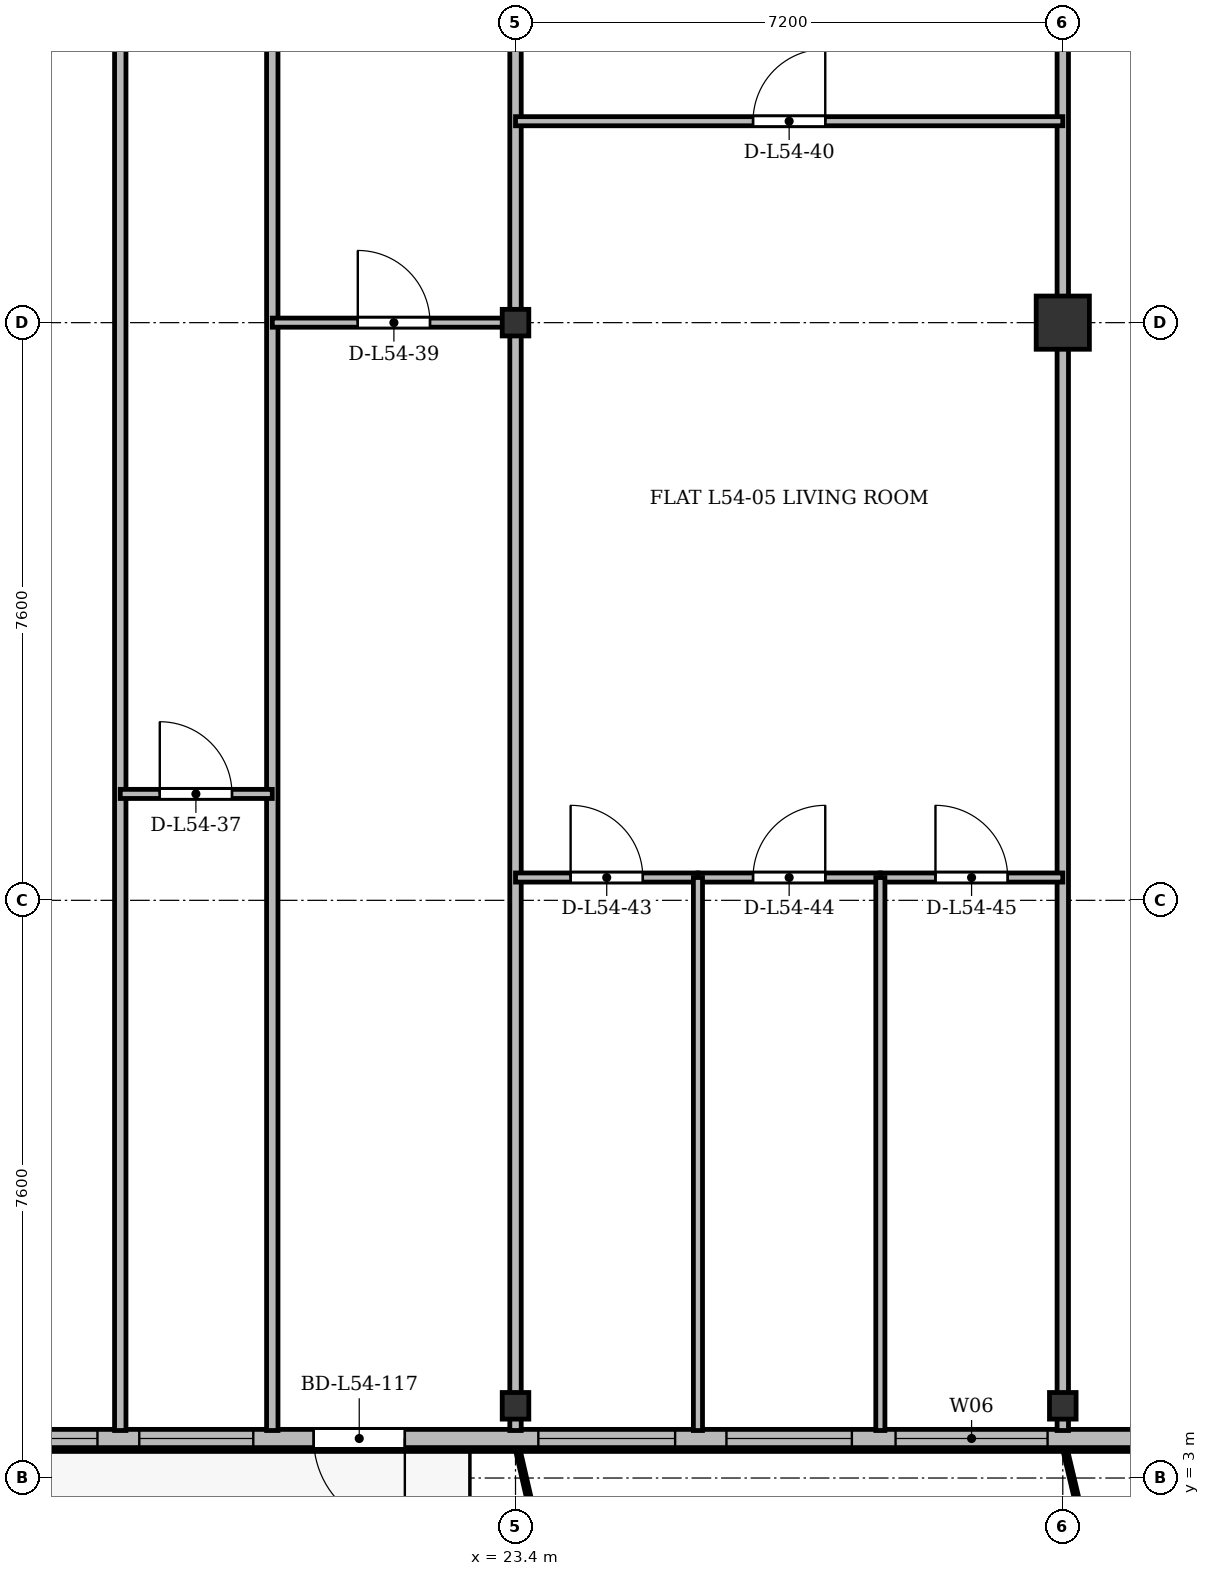
"""IFC4 building model, lengths in metres.
Left out: names, types, materials, properties, quantities, classifications, styles, units other than length and angle.
Written with IfcOpenShell. Run it as: python <this file> out.ifc"""

import sys

from ifc_helpers import new_model, si_unit, direction, frame, frame_2d, origin, origin_2d, place, context, subcontext, project, spatial, rectangle, i_section, extrude, source, transform, mapped, element, fill, save


model = new_model("IFC4")
c1 = context("Model", 3, precision=1e-05, world=origin(), true_north=direction((0.0, 1.0)))
c2 = subcontext(c1, "Body", "Model", "MODEL_VIEW")
j1 = project(units=[si_unit("LENGTHUNIT", "METRE"), si_unit("PLANEANGLEUNIT", "RADIAN")], contexts=[c1])
p1 = place(None, origin())
s1 = spatial("IfcSite", under=j1, at=p1, CompositionType="ELEMENT")
p2 = place(p1, origin())
s2 = spatial("IfcBuilding", under=s1, at=p2, CompositionType="ELEMENT")
p3 = place(p2, frame((0.0, 0.0, 208.5)))
s3 = spatial("IfcBuildingStorey", under=s2, at=p3, CompositionType="ELEMENT", Elevation=208.5)
m1 = source(origin(), c2, "Body", "SweptSolid", [
    extrude(i_section(OverallWidth=0.35, OverallDepth=0.35, WebThickness=0.018, FlangeThickness=0.028, at=origin_2d()), origin(), (0.0, 0.0, 1.0), 3.6),
])
for number, where, z_axis, x_axis in (
    (1, (23.4, 3.95, 0.0), (0.0, 0.0, 1.0), (1.0, 0.0, 0.0)),
    (2, (23.4, 18.2, 0.0), (0.0, 0.0, 1.0), (1.0, 0.0, 0.0)),
    (3, (30.6, 3.95, 0.0), (0.0, 0.0, 1.0), (1.0, 0.0, 0.0)),
):
    element("IfcColumn", number, at=place(p3, frame(where, z_axis=z_axis, x_axis=x_axis)), inside=s3, PredefinedType="COLUMN", context=c2, shape_type="MappedRepresentation", body=[
        mapped(m1, transform((0.0, 0.0, 0.0), x_axis=(1.0, 0.0, 0.0), y_axis=(0.0, 1.0, 0.0), z_axis=(0.0, 0.0, 1.0), scale=1.0)),
    ])
m2 = source(origin(), c2, "Body", "SweptSolid", [
    extrude(rectangle(XDim=0.7, YDim=0.7, at=origin_2d()), origin(), (0.0, 0.0, 1.0), 3.6),
])
p4 = place(p3, frame((30.6, 18.2, 0.0), z_axis=(0.0, 0.0, 1.0), x_axis=(1.0, 0.0, 0.0)))
e4 = element("IfcColumn", 4, at=p4, inside=s3, PredefinedType="COLUMN", context=c2, shape_type="MappedRepresentation", body=[
    mapped(m2, transform((0.0, 0.0, 0.0), x_axis=(1.0, 0.0, 0.0), y_axis=(0.0, 1.0, 0.0), z_axis=(0.0, 0.0, 1.0), scale=1.0)),
])
p5 = place(p3, frame((63.4, 3.52, 0.0), z_axis=(0.0, 0.0, 1.0), x_axis=(-1.0, 0.0, 0.0)))
e5 = element("IfcWall", 5, at=p5, inside=s3, PredefinedType="SOLIDWALL", context=c2, shape_type="SweptSolid", body=[
    extrude(rectangle(XDim=52.4, YDim=0.24, at=frame_2d((26.2, 0.0))), origin(), (0.0, 0.0, 1.0), 3.36),
])
p6 = place(p5, frame((1.52, 0.0, 0.9)))
e6 = element("IfcOpeningElement", 6, at=p6, cuts=e5, PredefinedType="OPENING", context=c2, shape_type="SweptSolid", body=[
    extrude(rectangle(XDim=1.65, YDim=1.85, at=frame_2d((0.825, 0.925))), frame((0.0, 0.13, 0.0), z_axis=(0.0, -1.0, 0.0), x_axis=(1.0, 0.0, 0.0)), (0.0, 0.0, 1.0), 0.26),
])
p7 = place(p5, frame((5.0, 0.0, 0.9)))
e7 = element("IfcOpeningElement", 7, at=p7, cuts=e5, PredefinedType="OPENING", context=c2, shape_type="SweptSolid", body=[
    extrude(rectangle(XDim=1.8, YDim=1.8, at=frame_2d((0.9, 0.9))), frame((0.0, 0.13, 0.0), z_axis=(0.0, -1.0, 0.0), x_axis=(1.0, 0.0, 0.0)), (0.0, 0.0, 1.0), 0.26),
])
p8 = place(p5, frame((7.45, 0.0, 0.9)))
e8 = element("IfcOpeningElement", 8, at=p8, cuts=e5, PredefinedType="OPENING", context=c2, shape_type="SweptSolid", body=[
    extrude(rectangle(XDim=1.5, YDim=1.75, at=frame_2d((0.75, 0.875))), frame((0.0, 0.13, 0.0), z_axis=(0.0, -1.0, 0.0), x_axis=(1.0, 0.0, 0.0)), (0.0, 0.0, 1.0), 0.26),
])
p9 = place(p5, frame((10.05, 0.0, 0.9)))
e9 = element("IfcOpeningElement", 9, at=p9, cuts=e5, PredefinedType="OPENING", context=c2, shape_type="SweptSolid", body=[
    extrude(rectangle(XDim=1.5, YDim=1.75, at=frame_2d((0.75, 0.875))), frame((0.0, 0.13, 0.0), z_axis=(0.0, -1.0, 0.0), x_axis=(1.0, 0.0, 0.0)), (0.0, 0.0, 1.0), 0.26),
])
p10 = place(p5, frame((14.217, 0.0, 0.0)))
e10 = element("IfcOpeningElement", 10, at=p10, cuts=e5, PredefinedType="OPENING", context=c2, shape_type="SweptSolid", body=[
    extrude(rectangle(XDim=1.2, YDim=2.2, at=frame_2d((0.6, 1.1))), frame((0.0, 0.13, 0.0), z_axis=(0.0, -1.0, 0.0), x_axis=(1.0, 0.0, 0.0)), (0.0, 0.0, 1.0), 0.26),
])
p11 = place(p5, frame((20.108, 0.0, 0.9)))
e11 = element("IfcOpeningElement", 11, at=p11, cuts=e5, PredefinedType="OPENING", context=c2, shape_type="SweptSolid", body=[
    extrude(rectangle(XDim=1.65, YDim=1.85, at=frame_2d((0.825, 0.925))), frame((0.0, 0.13, 0.0), z_axis=(0.0, -1.0, 0.0), x_axis=(1.0, 0.0, 0.0)), (0.0, 0.0, 1.0), 0.26),
])
p12 = place(p5, frame((22.7, 0.0, 0.9)))
e12 = element("IfcOpeningElement", 12, at=p12, cuts=e5, PredefinedType="OPENING", context=c2, shape_type="SweptSolid", body=[
    extrude(rectangle(XDim=1.8, YDim=1.8, at=frame_2d((0.9, 0.9))), frame((0.0, 0.13, 0.0), z_axis=(0.0, -1.0, 0.0), x_axis=(1.0, 0.0, 0.0)), (0.0, 0.0, 1.0), 0.26),
])
p13 = place(p5, frame((25.166, 0.0, 0.9)))
e13 = element("IfcOpeningElement", 13, at=p13, cuts=e5, PredefinedType="OPENING", context=c2, shape_type="SweptSolid", body=[
    extrude(rectangle(XDim=2.2, YDim=1.8, at=frame_2d((1.1, 0.9))), frame((0.0, 0.13, 0.0), z_axis=(0.0, -1.0, 0.0), x_axis=(1.0, 0.0, 0.0)), (0.0, 0.0, 1.0), 0.26),
])
p14 = place(p5, frame((29.45, 0.0, 0.9)))
e14 = element("IfcOpeningElement", 14, at=p14, cuts=e5, PredefinedType="OPENING", context=c2, shape_type="SweptSolid", body=[
    extrude(rectangle(XDim=1.5, YDim=1.75, at=frame_2d((0.75, 0.875))), frame((0.0, 0.13, 0.0), z_axis=(0.0, -1.0, 0.0), x_axis=(1.0, 0.0, 0.0)), (0.0, 0.0, 1.0), 0.26),
])
p15 = place(p5, frame((33.0, 0.0, 0.9)))
e15 = element("IfcOpeningElement", 15, at=p15, cuts=e5, PredefinedType="OPENING", context=c2, shape_type="SweptSolid", body=[
    extrude(rectangle(XDim=2.0, YDim=1.95, at=frame_2d((1.0, 0.975))), frame((0.0, 0.13, 0.0), z_axis=(0.0, -1.0, 0.0), x_axis=(1.0, 0.0, 0.0)), (0.0, 0.0, 1.0), 0.26),
])
p16 = place(p5, frame((35.575, 0.0, 0.9)))
e16 = element("IfcOpeningElement", 16, at=p16, cuts=e5, PredefinedType="OPENING", context=c2, shape_type="SweptSolid", body=[
    extrude(rectangle(XDim=1.65, YDim=1.85, at=frame_2d((0.825, 0.925))), frame((0.0, 0.13, 0.0), z_axis=(0.0, -1.0, 0.0), x_axis=(1.0, 0.0, 0.0)), (0.0, 0.0, 1.0), 0.26),
])
p17 = place(p5, frame((37.9, 0.0, 0.9)))
e17 = element("IfcOpeningElement", 17, at=p17, cuts=e5, PredefinedType="OPENING", context=c2, shape_type="SweptSolid", body=[
    extrude(rectangle(XDim=1.8, YDim=1.8, at=frame_2d((0.9, 0.9))), frame((0.0, 0.13, 0.0), z_axis=(0.0, -1.0, 0.0), x_axis=(1.0, 0.0, 0.0)), (0.0, 0.0, 1.0), 0.26),
])
p18 = place(p5, frame((41.456, 0.0, 0.0)))
e18 = element("IfcOpeningElement", 18, at=p18, cuts=e5, PredefinedType="OPENING", context=c2, shape_type="SweptSolid", body=[
    extrude(rectangle(XDim=1.2, YDim=2.2, at=frame_2d((0.6, 1.1))), frame((0.0, 0.13, 0.0), z_axis=(0.0, -1.0, 0.0), x_axis=(1.0, 0.0, 0.0)), (0.0, 0.0, 1.0), 0.26),
])
p19 = place(p5, frame((43.45, 0.0, 0.9)))
e19 = element("IfcOpeningElement", 19, at=p19, cuts=e5, PredefinedType="OPENING", context=c2, shape_type="SweptSolid", body=[
    extrude(rectangle(XDim=1.5, YDim=1.75, at=frame_2d((0.75, 0.875))), frame((0.0, 0.13, 0.0), z_axis=(0.0, -1.0, 0.0), x_axis=(1.0, 0.0, 0.0)), (0.0, 0.0, 1.0), 0.26),
])
p20 = place(p5, frame((45.5, 0.0, 0.9)))
e20 = element("IfcOpeningElement", 20, at=p20, cuts=e5, PredefinedType="OPENING", context=c2, shape_type="SweptSolid", body=[
    extrude(rectangle(XDim=2.0, YDim=1.95, at=frame_2d((1.0, 0.975))), frame((0.0, 0.13, 0.0), z_axis=(0.0, -1.0, 0.0), x_axis=(1.0, 0.0, 0.0)), (0.0, 0.0, 1.0), 0.26),
])
p21 = place(p5, frame((49.23, 0.0, 0.9)))
e21 = element("IfcOpeningElement", 21, at=p21, cuts=e5, PredefinedType="OPENING", context=c2, shape_type="SweptSolid", body=[
    extrude(rectangle(XDim=1.65, YDim=1.85, at=frame_2d((0.825, 0.925))), frame((0.0, 0.13, 0.0), z_axis=(0.0, -1.0, 0.0), x_axis=(1.0, 0.0, 0.0)), (0.0, 0.0, 1.0), 0.26),
])
for number, where, z_axis, x_axis in (
    (22, (23.4, 3.625, 0.0), (0.0, 0.0, 1.0), (0.0, 1.0, 0.0)),
    (23, (30.6, 3.625, 0.0), (0.0, 0.0, 1.0), (0.0, 1.0, 0.0)),
):
    element("IfcWall", number, at=place(p3, frame(where, z_axis=z_axis, x_axis=x_axis)), inside=s3, PredefinedType="PARTITIONING", context=c2, shape_type="SweptSolid", body=[
        extrude(rectangle(XDim=27.175, YDim=0.15, at=frame_2d((13.587, 0.0))), origin(), (0.0, 0.0, 1.0), 2.86),
    ])
for number, where, z_axis, x_axis in (
    (24, (18.2, 3.625, 0.0), (0.0, 0.0, 1.0), (0.0, 1.0, 0.0)),
    (25, (20.2, 3.625, 0.0), (0.0, 0.0, 1.0), (0.0, 1.0, 0.0)),
):
    element("IfcWall", number, at=place(p3, frame(where, z_axis=z_axis, x_axis=x_axis)), inside=s3, PredefinedType="PARTITIONING", context=c2, shape_type="SweptSolid", body=[
        extrude(rectangle(XDim=27.175, YDim=0.15, at=frame_2d((13.587, 0.0))), origin(), (0.0, 0.0, 1.0), 2.91),
    ])
p22 = place(p3, frame((18.2, 12.0, 0.0), z_axis=(0.0, 0.0, 1.0), x_axis=(1.0, 0.0, 0.0)))
e26 = element("IfcWall", 26, at=p22, inside=s3, PredefinedType="PARTITIONING", context=c2, shape_type="SweptSolid", body=[
    extrude(rectangle(XDim=2.0, YDim=0.12, at=frame_2d((1.0, 0.0))), origin(), (0.0, 0.0, 1.0), 3.36),
])
p23 = place(p22, frame((0.52, 0.0, 0.0)))
e27 = element("IfcOpeningElement", 27, at=p23, cuts=e26, PredefinedType="OPENING", context=c2, shape_type="SweptSolid", body=[
    extrude(rectangle(XDim=0.95, YDim=2.15, at=frame_2d((0.475, 1.075))), frame((0.0, 0.07, 0.0), z_axis=(0.0, -1.0, 0.0), x_axis=(1.0, 0.0, 0.0)), (0.0, 0.0, 1.0), 0.14),
])
p24 = place(p3, frame((20.2, 18.2, 0.0), z_axis=(0.0, 0.0, 1.0), x_axis=(1.0, 0.0, 0.0)))
e28 = element("IfcWall", 28, at=p24, inside=s3, PredefinedType="PARTITIONING", context=c2, shape_type="SweptSolid", body=[
    extrude(rectangle(XDim=3.2, YDim=0.12, at=frame_2d((1.6, 0.0))), origin(), (0.0, 0.0, 1.0), 2.91),
])
p25 = place(p24, frame((1.125, 0.0, 0.0)))
e29 = element("IfcOpeningElement", 29, at=p25, cuts=e28, PredefinedType="OPENING", context=c2, shape_type="SweptSolid", body=[
    extrude(rectangle(XDim=0.95, YDim=2.15, at=frame_2d((0.475, 1.075))), frame((0.0, 0.07, 0.0), z_axis=(0.0, -1.0, 0.0), x_axis=(1.0, 0.0, 0.0)), (0.0, 0.0, 1.0), 0.14),
])
p26 = place(p3, frame((23.4, 20.85, 0.0), z_axis=(0.0, 0.0, 1.0), x_axis=(1.0, 0.0, 0.0)))
e30 = element("IfcWall", 30, at=p26, inside=s3, PredefinedType="PARTITIONING", context=c2, shape_type="SweptSolid", body=[
    extrude(rectangle(XDim=7.2, YDim=0.12, at=frame_2d((3.6, 0.0))), origin(), (0.0, 0.0, 1.0), 2.86),
])
p27 = place(p26, frame((3.125, 0.0, 0.0)))
e31 = element("IfcOpeningElement", 31, at=p27, cuts=e30, PredefinedType="OPENING", context=c2, shape_type="SweptSolid", body=[
    extrude(rectangle(XDim=0.95, YDim=2.15, at=frame_2d((0.475, 1.075))), frame((0.0, 0.07, 0.0), z_axis=(0.0, -1.0, 0.0), x_axis=(1.0, 0.0, 0.0)), (0.0, 0.0, 1.0), 0.14),
])
p28 = place(p3, frame((23.4, 10.9, 0.0), z_axis=(0.0, 0.0, 1.0), x_axis=(1.0, 0.0, 0.0)))
e32 = element("IfcWall", 32, at=p28, inside=s3, PredefinedType="PARTITIONING", context=c2, shape_type="SweptSolid", body=[
    extrude(rectangle(XDim=2.4, YDim=0.12, at=frame_2d((1.2, 0.0))), origin(), (0.0, 0.0, 1.0), 2.86),
])
p29 = place(p28, frame((0.725, 0.0, 0.0)))
e33 = element("IfcOpeningElement", 33, at=p29, cuts=e32, PredefinedType="OPENING", context=c2, shape_type="SweptSolid", body=[
    extrude(rectangle(XDim=0.95, YDim=2.15, at=frame_2d((0.475, 1.075))), frame((0.0, 0.07, 0.0), z_axis=(0.0, -1.0, 0.0), x_axis=(1.0, 0.0, 0.0)), (0.0, 0.0, 1.0), 0.14),
])
p30 = place(p3, frame((25.8, 10.9, 0.0), z_axis=(0.0, 0.0, 1.0), x_axis=(1.0, 0.0, 0.0)))
e34 = element("IfcWall", 34, at=p30, inside=s3, PredefinedType="PARTITIONING", context=c2, shape_type="SweptSolid", body=[
    extrude(rectangle(XDim=2.4, YDim=0.12, at=frame_2d((1.2, 0.0))), origin(), (0.0, 0.0, 1.0), 3.36),
])
p31 = place(p30, frame((0.725, 0.0, 0.0)))
e35 = element("IfcOpeningElement", 35, at=p31, cuts=e34, PredefinedType="OPENING", context=c2, shape_type="SweptSolid", body=[
    extrude(rectangle(XDim=0.95, YDim=2.15, at=frame_2d((0.475, 1.075))), frame((0.0, 0.07, 0.0), z_axis=(0.0, -1.0, 0.0), x_axis=(1.0, 0.0, 0.0)), (0.0, 0.0, 1.0), 0.14),
])
p32 = place(p3, frame((25.8, 3.625, 0.0), z_axis=(0.0, 0.0, 1.0), x_axis=(0.0, 1.0, 0.0)))
e36 = element("IfcWall", 36, at=p32, inside=s3, PredefinedType="PARTITIONING", context=c2, shape_type="SweptSolid", body=[
    extrude(rectangle(XDim=7.275, YDim=0.12, at=frame_2d((3.637, 0.0))), origin(), (0.0, 0.0, 1.0), 2.91),
])
p33 = place(p3, frame((28.2, 10.9, 0.0), z_axis=(0.0, 0.0, 1.0), x_axis=(1.0, 0.0, 0.0)))
e37 = element("IfcWall", 37, at=p33, inside=s3, PredefinedType="PARTITIONING", context=c2, shape_type="SweptSolid", body=[
    extrude(rectangle(XDim=2.4, YDim=0.12, at=frame_2d((1.2, 0.0))), origin(), (0.0, 0.0, 1.0), 2.86),
])
p34 = place(p33, frame((0.725, 0.0, 0.0)))
e38 = element("IfcOpeningElement", 38, at=p34, cuts=e37, PredefinedType="OPENING", context=c2, shape_type="SweptSolid", body=[
    extrude(rectangle(XDim=0.95, YDim=2.15, at=frame_2d((0.475, 1.075))), frame((0.0, 0.07, 0.0), z_axis=(0.0, -1.0, 0.0), x_axis=(1.0, 0.0, 0.0)), (0.0, 0.0, 1.0), 0.14),
])
p35 = place(p3, frame((28.2, 3.625, 0.0), z_axis=(0.0, 0.0, 1.0), x_axis=(0.0, 1.0, 0.0)))
e39 = element("IfcWall", 39, at=p35, inside=s3, PredefinedType="PARTITIONING", context=c2, shape_type="SweptSolid", body=[
    extrude(rectangle(XDim=7.275, YDim=0.12, at=frame_2d((3.637, 0.0))), origin(), (0.0, 0.0, 1.0), 2.91),
])
m3 = source(origin(), c2, "Body", "SweptSolid", [
    extrude(rectangle(XDim=2.0, YDim=1.95, at=frame_2d((1.0, 0.975))), frame((0.0, 0.03, 0.0), z_axis=(0.0, -1.0, 0.0), x_axis=(1.0, 0.0, 0.0)), (0.0, 0.0, 1.0), 0.06),
])
p36 = place(p15, origin())
e40 = element("IfcWindow", 40, at=p36, inside=s3, PartitioningType="SINGLE_PANEL", PredefinedType="WINDOW", context=c2, shape_type="MappedRepresentation", body=[
    mapped(m3, transform((0.0, 0.0, 0.0), x_axis=(1.0, 0.0, 0.0), y_axis=(0.0, 1.0, 0.0), z_axis=(0.0, 0.0, 1.0), scale=1.0)),
])
fill(e15, e40)
m4 = source(origin(), c2, "Body", "SweptSolid", [
    extrude(rectangle(XDim=1.65, YDim=1.85, at=frame_2d((0.825, 0.925))), frame((0.0, 0.03, 0.0), z_axis=(0.0, -1.0, 0.0), x_axis=(1.0, 0.0, 0.0)), (0.0, 0.0, 1.0), 0.06),
])
p37 = place(p16, origin())
e41 = element("IfcWindow", 41, at=p37, inside=s3, PartitioningType="SINGLE_PANEL", PredefinedType="WINDOW", context=c2, shape_type="MappedRepresentation", body=[
    mapped(m4, transform((0.0, 0.0, 0.0), x_axis=(1.0, 0.0, 0.0), y_axis=(0.0, 1.0, 0.0), z_axis=(0.0, 0.0, 1.0), scale=1.0)),
])
fill(e16, e41)
m5 = source(origin(), c2, "Body", "SweptSolid", [
    extrude(rectangle(XDim=1.8, YDim=1.8, at=frame_2d((0.9, 0.9))), frame((0.0, 0.03, 0.0), z_axis=(0.0, -1.0, 0.0), x_axis=(1.0, 0.0, 0.0)), (0.0, 0.0, 1.0), 0.06),
])
p38 = place(p17, origin())
e42 = element("IfcWindow", 42, at=p38, inside=s3, PartitioningType="SINGLE_PANEL", PredefinedType="WINDOW", context=c2, shape_type="MappedRepresentation", body=[
    mapped(m5, transform((0.0, 0.0, 0.0), x_axis=(1.0, 0.0, 0.0), y_axis=(0.0, 1.0, 0.0), z_axis=(0.0, 0.0, 1.0), scale=1.0)),
])
fill(e17, e42)
m6 = source(origin(), c2, "Body", "SweptSolid", [
    extrude(rectangle(XDim=1.2, YDim=2.2, at=frame_2d((0.6, 1.1))), frame((0.0, 0.025, 0.0), z_axis=(0.0, -1.0, 0.0), x_axis=(1.0, 0.0, 0.0)), (0.0, 0.0, 1.0), 0.05),
])
p39 = place(p18, origin())
e43 = element("IfcDoor", 43, at=p39, inside=s3, OperationType="SINGLE_SWING_LEFT", PredefinedType="DOOR", context=c2, shape_type="MappedRepresentation", body=[
    mapped(m6, transform((0.0, 0.0, 0.0), x_axis=(1.0, 0.0, 0.0), y_axis=(0.0, 1.0, 0.0), z_axis=(0.0, 0.0, 1.0), scale=1.0)),
])
fill(e18, e43)
m7 = source(origin(), c2, "Body", "SweptSolid", [
    extrude(rectangle(XDim=1.5, YDim=1.75, at=frame_2d((0.75, 0.875))), frame((0.0, 0.03, 0.0), z_axis=(0.0, -1.0, 0.0), x_axis=(1.0, 0.0, 0.0)), (0.0, 0.0, 1.0), 0.06),
])
p40 = place(p19, origin())
e44 = element("IfcWindow", 44, at=p40, inside=s3, PartitioningType="SINGLE_PANEL", PredefinedType="WINDOW", context=c2, shape_type="MappedRepresentation", body=[
    mapped(m7, transform((0.0, 0.0, 0.0), x_axis=(1.0, 0.0, 0.0), y_axis=(0.0, 1.0, 0.0), z_axis=(0.0, 0.0, 1.0), scale=1.0)),
])
fill(e19, e44)
p41 = place(p20, origin())
e45 = element("IfcWindow", 45, at=p41, inside=s3, PartitioningType="SINGLE_PANEL", PredefinedType="WINDOW", context=c2, shape_type="MappedRepresentation", body=[
    mapped(m3, transform((0.0, 0.0, 0.0), x_axis=(1.0, 0.0, 0.0), y_axis=(0.0, 1.0, 0.0), z_axis=(0.0, 0.0, 1.0), scale=1.0)),
])
fill(e20, e45)
m8 = source(origin(), c2, "Body", "SweptSolid", [
    extrude(rectangle(XDim=0.95, YDim=2.15, at=frame_2d((0.475, 1.075))), frame((0.0, 0.025, 0.0), z_axis=(0.0, -1.0, 0.0), x_axis=(1.0, 0.0, 0.0)), (0.0, 0.0, 1.0), 0.05),
])
p42 = place(p23, origin())
e46 = element("IfcDoor", 46, at=p42, inside=s3, OperationType="SINGLE_SWING_LEFT", PredefinedType="DOOR", context=c2, shape_type="MappedRepresentation", body=[
    mapped(m8, transform((0.0, 0.0, 0.0), x_axis=(1.0, 0.0, 0.0), y_axis=(0.0, 1.0, 0.0), z_axis=(0.0, 0.0, 1.0), scale=1.0)),
])
fill(e27, e46)
p43 = place(p25, origin())
e47 = element("IfcDoor", 47, at=p43, inside=s3, OperationType="SINGLE_SWING_LEFT", PredefinedType="DOOR", context=c2, shape_type="MappedRepresentation", body=[
    mapped(m8, transform((0.0, 0.0, 0.0), x_axis=(1.0, 0.0, 0.0), y_axis=(0.0, 1.0, 0.0), z_axis=(0.0, 0.0, 1.0), scale=1.0)),
])
fill(e29, e47)
p44 = place(p27, origin())
e48 = element("IfcDoor", 48, at=p44, inside=s3, OperationType="SINGLE_SWING_RIGHT", PredefinedType="DOOR", context=c2, shape_type="MappedRepresentation", body=[
    mapped(m8, transform((0.0, 0.0, 0.0), x_axis=(1.0, 0.0, 0.0), y_axis=(0.0, 1.0, 0.0), z_axis=(0.0, 0.0, 1.0), scale=1.0)),
])
fill(e31, e48)
p45 = place(p29, origin())
e49 = element("IfcDoor", 49, at=p45, inside=s3, OperationType="SINGLE_SWING_LEFT", PredefinedType="DOOR", context=c2, shape_type="MappedRepresentation", body=[
    mapped(m8, transform((0.0, 0.0, 0.0), x_axis=(1.0, 0.0, 0.0), y_axis=(0.0, 1.0, 0.0), z_axis=(0.0, 0.0, 1.0), scale=1.0)),
])
fill(e33, e49)
p46 = place(p31, origin())
e50 = element("IfcDoor", 50, at=p46, inside=s3, OperationType="SINGLE_SWING_RIGHT", PredefinedType="DOOR", context=c2, shape_type="MappedRepresentation", body=[
    mapped(m8, transform((0.0, 0.0, 0.0), x_axis=(1.0, 0.0, 0.0), y_axis=(0.0, 1.0, 0.0), z_axis=(0.0, 0.0, 1.0), scale=1.0)),
])
fill(e35, e50)
p47 = place(p34, origin())
e51 = element("IfcDoor", 51, at=p47, inside=s3, OperationType="SINGLE_SWING_LEFT", PredefinedType="DOOR", context=c2, shape_type="MappedRepresentation", body=[
    mapped(m8, transform((0.0, 0.0, 0.0), x_axis=(1.0, 0.0, 0.0), y_axis=(0.0, 1.0, 0.0), z_axis=(0.0, 0.0, 1.0), scale=1.0)),
])
fill(e38, e51)
save(model, sys.argv[1])
